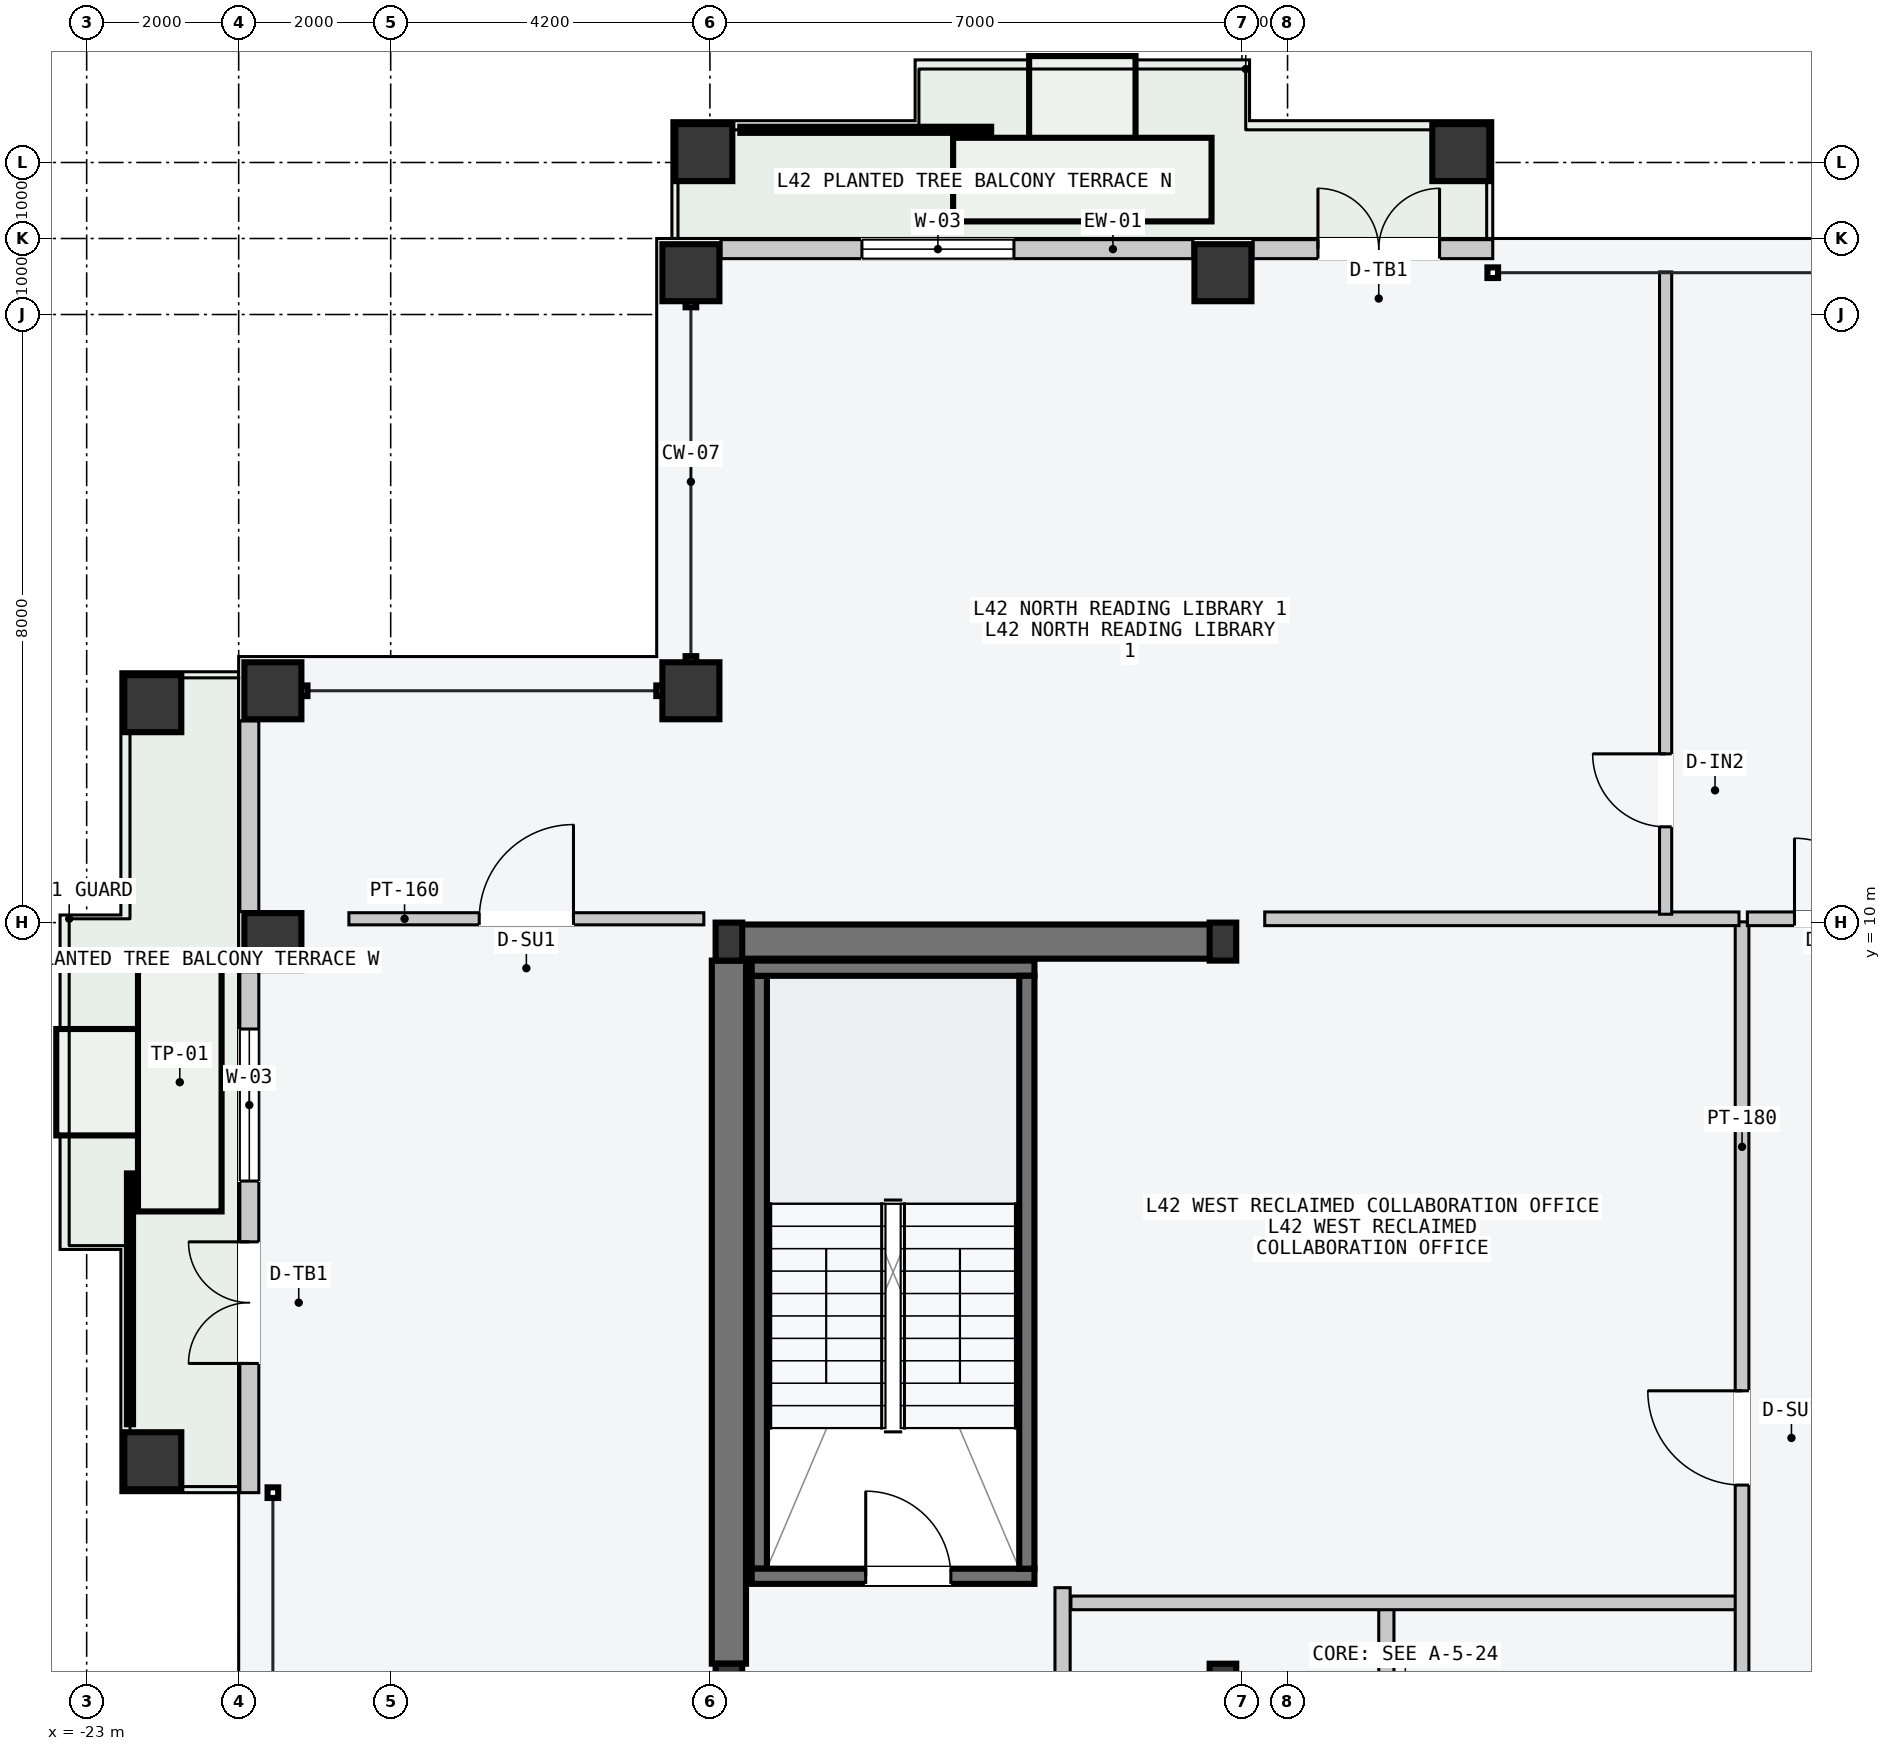
"""IFC4 building model, lengths in metres.
Left out: names, types, materials, properties, quantities, classifications, styles, units other than length and angle.
Written with IfcOpenShell. Run it as: python <this file> out.ifc"""

import sys

from ifc_helpers import new_model, si_unit, direction, frame, frame_2d, origin, origin_2d, place, context, subcontext, project, spatial, rectangle, hollow_rectangle, i_section, extrude, element, fill, save


model = new_model("IFC4")
c1 = context("Model", 3, precision=1e-05, world=origin(), true_north=direction((0.0, 1.0)))
c2 = subcontext(c1, "Body", "Model", "MODEL_VIEW")
j1 = project(units=[si_unit("LENGTHUNIT", "METRE"), si_unit("PLANEANGLEUNIT", "RADIAN")], contexts=[c1])
p1 = place(None, origin())
s1 = spatial("IfcSite", under=j1, at=p1, CompositionType="ELEMENT")
p2 = place(p1, origin())
s2 = spatial("IfcBuilding", under=s1, at=p2, CompositionType="ELEMENT")
p3 = place(p2, frame((0.0, 0.0, 162.3)))
s3 = spatial("IfcBuildingStorey", under=s2, at=p3, CompositionType="ELEMENT", Elevation=162.3)
p4 = place(p3, frame((-14.53, 9.75, -0.2), z_axis=(0.0, 0.0, 1.0), x_axis=(1.0, 0.0, 0.0)))
e1 = element("IfcWall", 1, at=p4, inside=s3, PredefinedType="SHEAR", context=c2, shape_type="SweptSolid", body=[
    extrude(rectangle(XDim=6.46, YDim=0.45, at=frame_2d((3.23, 0.0))), origin(), (0.0, 0.0, 1.0), 3.6),
])
p5 = place(p3, frame((-14.55, 0.25, -0.2), z_axis=(0.0, 0.0, 1.0), x_axis=(0.0, 1.0, 0.0)))
e2 = element("IfcWall", 2, at=p5, inside=s3, PredefinedType="SHEAR", context=c2, shape_type="SweptSolid", body=[
    extrude(rectangle(XDim=9.25, YDim=0.45, at=frame_2d((4.625, 0.0))), origin(), (0.0, 0.0, 1.0), 3.6),
])
p6 = place(p3, frame((-14.15, 1.5, -0.2), z_axis=(0.0, 0.0, 1.0), x_axis=(0.0, 1.0, 0.0)))
e3 = element("IfcWall", 3, at=p6, inside=s3, PredefinedType="SOLIDWALL", context=c2, shape_type="SweptSolid", body=[
    extrude(rectangle(XDim=7.8, YDim=0.2, at=frame_2d((3.9, 0.0))), origin(), (0.0, 0.0, 1.0), 3.6),
])
p7 = place(p3, frame((-14.25, 1.4, -0.2), z_axis=(0.0, 0.0, 1.0), x_axis=(1.0, 0.0, 0.0)))
e4 = element("IfcWall", 4, at=p7, inside=s3, PredefinedType="SOLIDWALL", context=c2, shape_type="SweptSolid", body=[
    extrude(rectangle(XDim=3.72, YDim=0.2, at=frame_2d((1.86, 0.0))), origin(), (0.0, 0.0, 1.0), 3.6),
])
p8 = place(p7, frame((1.5, 0.0, 0.2)))
e5 = element("IfcOpeningElement", 5, at=p8, cuts=e4, PredefinedType="OPENING", context=c2, shape_type="SweptSolid", body=[
    extrude(rectangle(XDim=1.12, YDim=2.18, at=frame_2d((0.56, 1.09))), frame((0.0, 0.11, 0.0), z_axis=(0.0, -1.0, 0.0), x_axis=(1.0, 0.0, 0.0)), (0.0, 0.0, 1.0), 0.22),
])
p9 = place(p3, frame((-14.25, 9.4, -0.2), z_axis=(0.0, 0.0, 1.0), x_axis=(1.0, 0.0, 0.0)))
e6 = element("IfcWall", 6, at=p9, inside=s3, PredefinedType="SOLIDWALL", context=c2, shape_type="SweptSolid", body=[
    extrude(rectangle(XDim=3.72, YDim=0.2, at=frame_2d((1.86, 0.0))), origin(), (0.0, 0.0, 1.0), 3.6),
])
p10 = place(p3, frame((-10.63, 1.5, -0.2), z_axis=(0.0, 0.0, 1.0), x_axis=(0.0, 1.0, 0.0)))
e7 = element("IfcWall", 7, at=p10, inside=s3, PredefinedType="SOLIDWALL", context=c2, shape_type="SweptSolid", body=[
    extrude(rectangle(XDim=7.8, YDim=0.2, at=frame_2d((3.9, 0.0))), origin(), (0.0, 0.0, 1.0), 3.6),
])
for number, where, z_axis, x_axis in (
    (8, (-14.55, 0.0, 0.0), (0.0, 0.0, 1.0), (1.0, 0.0, 0.0)),
    (9, (-14.55, 9.75, 0.0), (0.0, 0.0, 1.0), (1.0, 0.0, 0.0)),
    (10, (-8.05, 0.0, 0.0), (0.0, 0.0, 1.0), (1.0, 0.0, 0.0)),
    (11, (-8.05, 9.75, 0.0), (0.0, 0.0, 1.0), (1.0, 0.0, 0.0)),
):
    element("IfcColumn", number, at=place(p3, frame(where, z_axis=z_axis, x_axis=x_axis)), inside=s3, PredefinedType="COLUMN", context=c2, shape_type="SweptSolid", body=[
        extrude(i_section(OverallWidth=0.35, OverallDepth=0.5, WebThickness=0.02, FlangeThickness=0.032, at=origin_2d()), origin(), (0.0, 0.0, 1.0), 3.6),
    ])
for number, where, z_axis, x_axis in (
    (12, (-15.05, 18.55, 0.0), (0.0, 0.0, 1.0), (1.0, 0.0, 0.0)),
    (13, (-8.05, 18.55, 0.0), (0.0, 0.0, 1.0), (1.0, 0.0, 0.0)),
    (14, (-20.55, 9.75, 0.0), (0.0, 0.0, 1.0), (0.0, 1.0, 0.0)),
    (15, (-20.55, 13.05, 0.0), (0.0, 0.0, 1.0), (0.0, 1.0, 0.0)),
    (16, (-15.05, 13.05, 0.0), (0.0, 0.0, 1.0), (1.0, 0.0, 0.0)),
    (17, (-14.88, 20.13, 0.0), (0.0, 0.0, 1.0), (1.0, 0.0, 0.0)),
    (18, (-4.92, 20.13, 0.0), (0.0, 0.0, 1.0), (1.0, 0.0, 0.0)),
    (19, (-22.13, 2.92, 0.0), (0.0, 0.0, 1.0), (0.0, 1.0, 0.0)),
    (20, (-22.13, 12.88, 0.0), (0.0, 0.0, 1.0), (0.0, 1.0, 0.0)),
):
    element("IfcColumn", number, at=place(p3, frame(where, z_axis=z_axis, x_axis=x_axis)), inside=s3, PredefinedType="COLUMN", context=c2, shape_type="SweptSolid", body=[
        extrude(hollow_rectangle(XDim=0.75, YDim=0.75, WallThickness=0.032, at=origin_2d()), origin(), (0.0, 0.0, 1.0), 3.6),
    ])
p11 = place(p3, frame((-14.655, 18.86, 0.0), z_axis=(0.0, 0.0, 1.0), x_axis=(1.0, 0.0, 0.0)))
e21 = element("IfcWall", 21, at=p11, inside=s3, PredefinedType="STANDARD", context=c2, shape_type="SweptSolid", body=[
    extrude(rectangle(XDim=6.21, YDim=0.25, at=frame_2d((3.105, 0.0))), origin(), (0.0, 0.0, 1.0), 3.4),
])
p12 = place(p11, frame((1.855, 0.0, 0.85)))
e22 = element("IfcOpeningElement", 22, at=p12, cuts=e21, PredefinedType="OPENING", context=c2, shape_type="SweptSolid", body=[
    extrude(rectangle(XDim=2.0, YDim=2.1, at=frame_2d((1.0, 1.05))), frame((0.0, 0.135, 0.0), z_axis=(0.0, -1.0, 0.0), x_axis=(1.0, 0.0, 0.0)), (0.0, 0.0, 1.0), 0.27),
])
p13 = place(p3, frame((-7.655, 18.86, 0.0), z_axis=(0.0, 0.0, 1.0), x_axis=(1.0, 0.0, 0.0)))
e23 = element("IfcWall", 23, at=p13, inside=s3, PredefinedType="STANDARD", context=c2, shape_type="SweptSolid", body=[
    extrude(rectangle(XDim=3.155, YDim=0.25, at=frame_2d((1.578, 0.0))), origin(), (0.0, 0.0, 1.0), 3.4),
])
p14 = place(p13, frame((0.855, 0.0, 0.0)))
e24 = element("IfcOpeningElement", 24, at=p14, cuts=e23, PredefinedType="OPENING", context=c2, shape_type="SweptSolid", body=[
    extrude(rectangle(XDim=1.6, YDim=2.2, at=frame_2d((0.8, 1.1))), frame((0.0, 0.135, 0.0), z_axis=(0.0, -1.0, 0.0), x_axis=(1.0, 0.0, 0.0)), (0.0, 0.0, 1.0), 0.27),
])
p15 = place(p3, frame((-20.86, 2.5, 0.0), z_axis=(0.0, 0.0, 1.0), x_axis=(0.0, 1.0, 0.0)))
e25 = element("IfcWall", 25, at=p15, inside=s3, PredefinedType="STANDARD", context=c2, shape_type="SweptSolid", body=[
    extrude(rectangle(XDim=6.855, YDim=0.25, at=frame_2d((3.427, 0.0))), origin(), (0.0, 0.0, 1.0), 3.4),
])
p16 = place(p15, frame((1.7, 0.0, 0.0)))
e26 = element("IfcOpeningElement", 26, at=p16, cuts=e25, PredefinedType="OPENING", context=c2, shape_type="SweptSolid", body=[
    extrude(rectangle(XDim=1.6, YDim=2.2, at=frame_2d((0.8, 1.1))), frame((0.0, 0.135, 0.0), z_axis=(0.0, -1.0, 0.0), x_axis=(1.0, 0.0, 0.0)), (0.0, 0.0, 1.0), 0.27),
])
p17 = place(p15, frame((4.1, 0.0, 0.85)))
e27 = element("IfcOpeningElement", 27, at=p17, cuts=e25, PredefinedType="OPENING", context=c2, shape_type="SweptSolid", body=[
    extrude(rectangle(XDim=2.0, YDim=2.1, at=frame_2d((1.0, 1.05))), frame((0.0, 0.135, 0.0), z_axis=(0.0, -1.0, 0.0), x_axis=(1.0, 0.0, 0.0)), (0.0, 0.0, 1.0), 0.27),
])
p18 = place(p3, frame((-20.86, 10.145, 0.0), z_axis=(0.0, 0.0, 1.0), x_axis=(0.0, 1.0, 0.0)))
e28 = element("IfcWall", 28, at=p18, inside=s3, PredefinedType="STANDARD", context=c2, shape_type="SweptSolid", body=[
    extrude(rectangle(XDim=2.51, YDim=0.25, at=frame_2d((1.255, 0.0))), origin(), (0.0, 0.0, 1.0), 3.4),
])
p19 = place(p3, frame((-5.9, -9.45, 0.0), z_axis=(0.0, 0.0, 1.0), x_axis=(0.0, 1.0, 0.0)))
e29 = element("IfcWall", 29, at=p19, inside=s3, PredefinedType="PARTITIONING", context=c2, shape_type="SweptSolid", body=[
    extrude(rectangle(XDim=10.5, YDim=0.2, at=frame_2d((5.25, 0.0))), origin(), (0.0, 0.0, 1.0), 3.4),
])
p20 = place(p19, frame((3.9, 0.0, 0.0)))
e30 = element("IfcOpeningElement", 30, at=p20, cuts=e29, PredefinedType="OPENING", context=c2, shape_type="SweptSolid", body=[
    extrude(rectangle(XDim=1.5, YDim=2.2, at=frame_2d((0.75, 1.1))), frame((0.0, 0.11, 0.0), z_axis=(0.0, -1.0, 0.0), x_axis=(1.0, 0.0, 0.0)), (0.0, 0.0, 1.0), 0.22),
])
p21 = place(p3, frame((-10.16, -2.55, 0.0), z_axis=(0.0, 0.0, 1.0), x_axis=(0.0, 1.0, 0.0)))
e31 = element("IfcWall", 31, at=p21, inside=s3, PredefinedType="PARTITIONING", context=c2, shape_type="SweptSolid", body=[
    extrude(rectangle(XDim=3.8, YDim=0.2, at=frame_2d((1.9, 0.0))), origin(), (0.0, 0.0, 1.0), 3.4),
])
p22 = place(p21, frame((1.3, 0.0, 0.0)))
e32 = element("IfcOpeningElement", 32, at=p22, cuts=e31, PredefinedType="OPENING", context=c2, shape_type="SweptSolid", body=[
    extrude(rectangle(XDim=1.1, YDim=2.15, at=frame_2d((0.55, 1.075))), frame((0.0, 0.11, 0.0), z_axis=(0.0, -1.0, 0.0), x_axis=(1.0, 0.0, 0.0)), (0.0, 0.0, 1.0), 0.22),
])
p23 = place(p3, frame((-10.05, 1.05, 0.0), z_axis=(0.0, 0.0, 1.0), x_axis=(1.0, 0.0, 0.0)))
e33 = element("IfcWall", 33, at=p23, inside=s3, PredefinedType="PARTITIONING", context=c2, shape_type="SweptSolid", body=[
    extrude(rectangle(XDim=8.79, YDim=0.18, at=frame_2d((4.395, 0.0))), origin(), (0.0, 0.0, 1.0), 3.4),
])
p24 = place(p3, frame((-1.22, -3.5, 0.0), z_axis=(0.0, 0.0, 1.0), x_axis=(0.0, 1.0, 0.0)))
e34 = element("IfcWall", 34, at=p24, inside=s3, PredefinedType="PARTITIONING", context=c2, shape_type="SweptSolid", body=[
    extrude(rectangle(XDim=13.51, YDim=0.18, at=frame_2d((6.755, 0.0))), origin(), (0.0, 0.0, 1.0), 3.4),
])
p25 = place(p24, frame((6.1, 0.0, 0.0)))
e35 = element("IfcOpeningElement", 35, at=p25, cuts=e34, PredefinedType="OPENING", context=c2, shape_type="SweptSolid", body=[
    extrude(rectangle(XDim=1.24, YDim=2.24, at=frame_2d((0.62, 1.12))), frame((0.0, 0.1, 0.0), z_axis=(0.0, -1.0, 0.0), x_axis=(1.0, 0.0, 0.0)), (0.0, 0.0, 1.0), 0.2),
])
p26 = place(p24, frame((1.6, 0.0, 0.0)))
e36 = element("IfcOpeningElement", 36, at=p26, cuts=e34, PredefinedType="OPENING", context=c2, shape_type="SweptSolid", body=[
    extrude(rectangle(XDim=0.96, YDim=2.18, at=frame_2d((0.48, 1.09))), frame((0.0, 0.1, 0.0), z_axis=(0.0, -1.0, 0.0), x_axis=(1.0, 0.0, 0.0)), (0.0, 0.0, 1.0), 0.2),
])
p27 = place(p3, frame((-7.5, 10.05, 0.0), z_axis=(0.0, 0.0, 1.0), x_axis=(1.0, 0.0, 0.0)))
e37 = element("IfcWall", 37, at=p27, inside=s3, PredefinedType="PARTITIONING", context=c2, shape_type="SweptSolid", body=[
    extrude(rectangle(XDim=6.24, YDim=0.18, at=frame_2d((3.12, 0.0))), origin(), (0.0, 0.0, 1.0), 3.4),
])
p28 = place(p3, frame((-2.226, 10.11, 0.0), z_axis=(0.0, 0.0, 1.0), x_axis=(0.0, 1.0, 0.0)))
e38 = element("IfcWall", 38, at=p28, inside=s3, PredefinedType="PARTITIONING", context=c2, shape_type="SweptSolid", body=[
    extrude(rectangle(XDim=8.45, YDim=0.16, at=frame_2d((4.225, 0.0))), origin(), (0.0, 0.0, 1.0), 3.4),
])
p29 = place(p28, frame((1.15, 0.0, 0.0)))
e39 = element("IfcOpeningElement", 39, at=p29, cuts=e38, PredefinedType="OPENING", context=c2, shape_type="SweptSolid", body=[
    extrude(rectangle(XDim=0.96, YDim=2.18, at=frame_2d((0.48, 1.09))), frame((0.0, 0.09, 0.0), z_axis=(0.0, -1.0, 0.0), x_axis=(1.0, 0.0, 0.0)), (0.0, 0.0, 1.0), 0.18),
])
p30 = place(p3, frame((-1.15, 10.05, 0.0), z_axis=(0.0, 0.0, 1.0), x_axis=(1.0, 0.0, 0.0)))
e40 = element("IfcWall", 40, at=p30, inside=s3, PredefinedType="PARTITIONING", context=c2, shape_type="SweptSolid", body=[
    extrude(rectangle(XDim=2.3, YDim=0.18, at=frame_2d((1.15, 0.0))), origin(), (0.0, 0.0, 1.0), 3.4),
])
p31 = place(p30, frame((0.62, 0.0, 0.0)))
e41 = element("IfcOpeningElement", 41, at=p31, cuts=e40, PredefinedType="OPENING", context=c2, shape_type="SweptSolid", body=[
    extrude(rectangle(XDim=1.06, YDim=2.2, at=frame_2d((0.53, 1.1))), frame((0.0, 0.1, 0.0), z_axis=(0.0, -1.0, 0.0), x_axis=(1.0, 0.0, 0.0)), (0.0, 0.0, 1.0), 0.2),
])
p32 = place(p3, frame((-19.55, 10.05, 0.0), z_axis=(0.0, 0.0, 1.0), x_axis=(1.0, 0.0, 0.0)))
e42 = element("IfcWall", 42, at=p32, inside=s3, PredefinedType="PARTITIONING", context=c2, shape_type="SweptSolid", body=[
    extrude(rectangle(XDim=4.67, YDim=0.16, at=frame_2d((2.335, 0.0))), origin(), (0.0, 0.0, 1.0), 3.4),
])
p33 = place(p32, frame((1.715, 0.0, 0.0)))
e43 = element("IfcOpeningElement", 43, at=p33, cuts=e42, PredefinedType="OPENING", context=c2, shape_type="SweptSolid", body=[
    extrude(rectangle(XDim=1.24, YDim=2.24, at=frame_2d((0.62, 1.12))), frame((0.0, 0.09, 0.0), z_axis=(0.0, -1.0, 0.0), x_axis=(1.0, 0.0, 0.0)), (0.0, 0.0, 1.0), 0.18),
])
p34 = place(p8, origin())
e44 = element("IfcDoor", 44, at=p34, inside=s3, OperationType="SINGLE_SWING_LEFT", PredefinedType="DOOR", context=c2, shape_type="SweptSolid", body=[
    extrude(rectangle(XDim=1.12, YDim=2.18, at=frame_2d((0.56, 1.09))), frame((0.0, 0.025, 0.0), z_axis=(0.0, -1.0, 0.0), x_axis=(1.0, 0.0, 0.0)), (0.0, 0.0, 1.0), 0.05),
])
fill(e5, e44)
p35 = place(p12, origin())
e45 = element("IfcWindow", 45, at=p35, inside=s3, PartitioningType="SINGLE_PANEL", PredefinedType="WINDOW", context=c2, shape_type="SweptSolid", body=[
    extrude(rectangle(XDim=2.0, YDim=2.1, at=frame_2d((1.0, 1.05))), frame((0.0, 0.03, 0.0), z_axis=(0.0, -1.0, 0.0), x_axis=(1.0, 0.0, 0.0)), (0.0, 0.0, 1.0), 0.06),
])
fill(e22, e45)
p36 = place(p14, origin())
e46 = element("IfcDoor", 46, at=p36, inside=s3, OperationType="DOUBLE_DOOR_SINGLE_SWING", PredefinedType="DOOR", context=c2, shape_type="SweptSolid", body=[
    extrude(rectangle(XDim=1.6, YDim=2.2, at=frame_2d((0.8, 1.1))), frame((0.0, 0.025, 0.0), z_axis=(0.0, -1.0, 0.0), x_axis=(1.0, 0.0, 0.0)), (0.0, 0.0, 1.0), 0.05),
])
fill(e24, e46)
p37 = place(p16, origin())
e47 = element("IfcDoor", 47, at=p37, inside=s3, OperationType="DOUBLE_DOOR_SINGLE_SWING", PredefinedType="DOOR", context=c2, shape_type="SweptSolid", body=[
    extrude(rectangle(XDim=1.6, YDim=2.2, at=frame_2d((0.8, 1.1))), frame((0.0, 0.025, 0.0), z_axis=(0.0, -1.0, 0.0), x_axis=(1.0, 0.0, 0.0)), (0.0, 0.0, 1.0), 0.05),
])
fill(e26, e47)
p38 = place(p17, origin())
e48 = element("IfcWindow", 48, at=p38, inside=s3, PartitioningType="SINGLE_PANEL", PredefinedType="WINDOW", context=c2, shape_type="SweptSolid", body=[
    extrude(rectangle(XDim=2.0, YDim=2.1, at=frame_2d((1.0, 1.05))), frame((0.0, 0.03, 0.0), z_axis=(0.0, -1.0, 0.0), x_axis=(1.0, 0.0, 0.0)), (0.0, 0.0, 1.0), 0.06),
])
fill(e27, e48)
p39 = place(p25, origin())
e49 = element("IfcDoor", 49, at=p39, inside=s3, OperationType="SINGLE_SWING_RIGHT", PredefinedType="DOOR", context=c2, shape_type="SweptSolid", body=[
    extrude(rectangle(XDim=1.24, YDim=2.24, at=frame_2d((0.62, 1.12))), frame((0.0, 0.025, 0.0), z_axis=(0.0, -1.0, 0.0), x_axis=(1.0, 0.0, 0.0)), (0.0, 0.0, 1.0), 0.05),
])
fill(e35, e49)
p40 = place(p29, origin())
e50 = element("IfcDoor", 50, at=p40, inside=s3, OperationType="SINGLE_SWING_RIGHT", PredefinedType="DOOR", context=c2, shape_type="SweptSolid", body=[
    extrude(rectangle(XDim=0.96, YDim=2.18, at=frame_2d((0.48, 1.09))), frame((0.0, 0.025, 0.0), z_axis=(0.0, -1.0, 0.0), x_axis=(1.0, 0.0, 0.0)), (0.0, 0.0, 1.0), 0.05),
])
fill(e39, e50)
p41 = place(p31, origin())
e51 = element("IfcDoor", 51, at=p41, inside=s3, OperationType="SINGLE_SWING_LEFT", PredefinedType="DOOR", context=c2, shape_type="SweptSolid", body=[
    extrude(rectangle(XDim=1.06, YDim=2.2, at=frame_2d((0.53, 1.1))), frame((0.0, 0.025, 0.0), z_axis=(0.0, -1.0, 0.0), x_axis=(1.0, 0.0, 0.0)), (0.0, 0.0, 1.0), 0.05),
])
fill(e41, e51)
p42 = place(p33, origin())
e52 = element("IfcDoor", 52, at=p42, inside=s3, OperationType="SINGLE_SWING_RIGHT", PredefinedType="DOOR", context=c2, shape_type="SweptSolid", body=[
    extrude(rectangle(XDim=1.24, YDim=2.24, at=frame_2d((0.62, 1.12))), frame((0.0, 0.025, 0.0), z_axis=(0.0, -1.0, 0.0), x_axis=(1.0, 0.0, 0.0)), (0.0, 0.0, 1.0), 0.05),
])
fill(e43, e52)
save(model, sys.argv[1])
